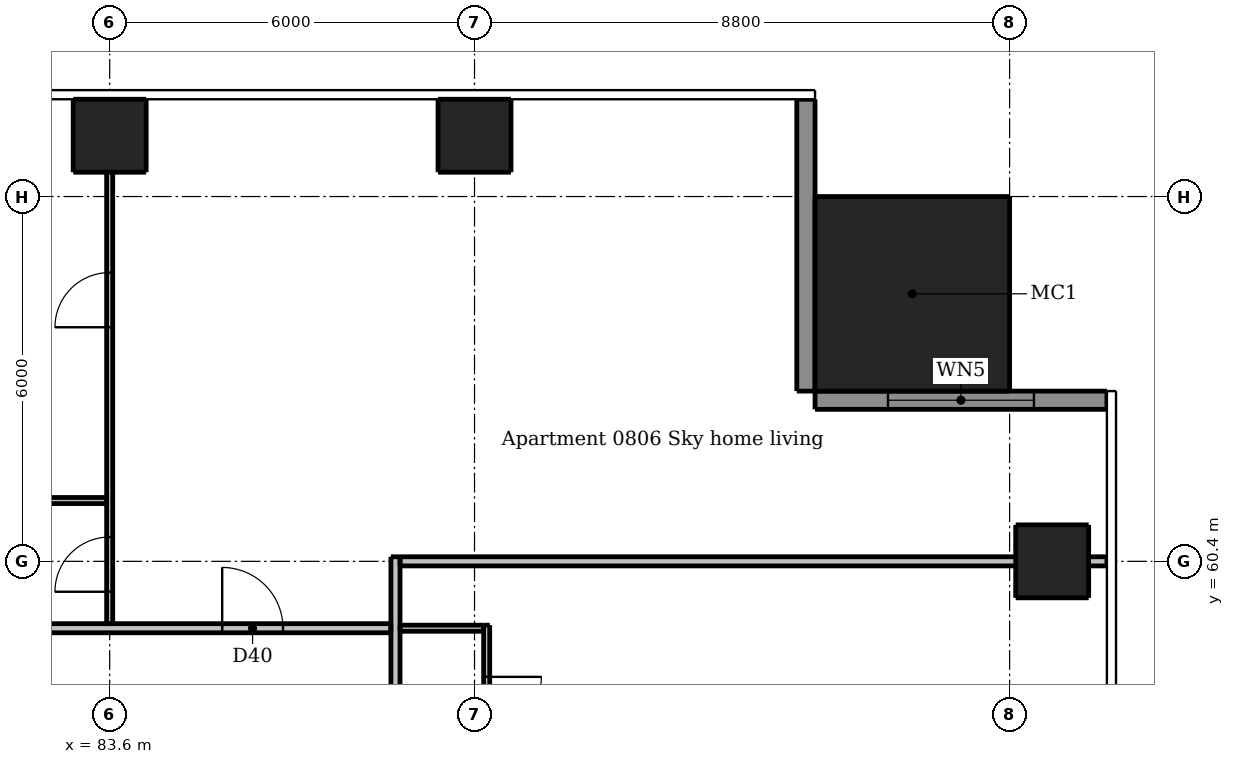
"""IFC4 building model, lengths in metres.
Left out: names, types, materials, properties, quantities, classifications, styles, units other than length and angle.
Written with IfcOpenShell. Run it as: python <this file> out.ifc"""

import sys

from ifc_helpers import new_model, si_unit, direction, frame, frame_2d, origin, origin_2d, place, context, subcontext, project, spatial, rectangle, extrude, element, fill, save


model = new_model("IFC4")
c1 = context("Model", 3, precision=1e-05, world=origin(), true_north=direction((0.0, 1.0)))
c2 = subcontext(c1, "Body", "Model", "MODEL_VIEW")
j1 = project(units=[si_unit("LENGTHUNIT", "METRE"), si_unit("PLANEANGLEUNIT", "RADIAN")], contexts=[c1])
p1 = place(None, origin())
s1 = spatial("IfcSite", under=j1, at=p1, CompositionType="ELEMENT")
p2 = place(p1, origin())
s2 = spatial("IfcBuilding", under=s1, at=p2, CompositionType="ELEMENT")
p3 = place(p2, frame((0.0, 0.0, 33.4)))
s3 = spatial("IfcBuildingStorey", under=s2, at=p3, CompositionType="ELEMENT", Elevation=33.4)
for number, where, z_axis, x_axis in (
    (1, (99.1, 60.4, 0.0), (0.0, 0.0, 1.0), (1.0, 0.0, 0.0)),
    (2, (83.6, 67.4, 0.0), (0.0, 0.0, 1.0), (1.0, 0.0, 0.0)),
    (3, (89.6, 67.4, 0.0), (0.0, 0.0, 1.0), (1.0, 0.0, 0.0)),
):
    element("IfcColumn", number, at=place(p3, frame(where, z_axis=z_axis, x_axis=x_axis)), inside=s3, PredefinedType="COLUMN", context=c2, shape_type="SweptSolid", body=[
        extrude(rectangle(XDim=1.2, YDim=1.2, at=origin_2d()), origin(), (0.0, 0.0, 1.0), 3.05),
    ])
p4 = place(p3, frame((96.8, 64.8, 0.0), z_axis=(0.0, 0.0, 1.0), x_axis=(1.0, 0.0, 0.0)))
e4 = element("IfcColumn", 4, at=p4, inside=s3, PredefinedType="COLUMN", context=c2, shape_type="SweptSolid", body=[
    extrude(rectangle(XDim=3.2, YDim=3.2, at=origin_2d()), origin(), (0.0, 0.0, 1.0), 3.3),
])
p5 = place(p3, frame((100.0, 63.05, 0.0), z_axis=(0.0, 0.0, 1.0), x_axis=(-1.0, 0.0, 0.0)))
e5 = element("IfcWall", 5, at=p5, inside=s3, PredefinedType="SOLIDWALL", context=c2, shape_type="SweptSolid", body=[
    extrude(rectangle(XDim=4.8, YDim=0.3, at=frame_2d((2.4, 0.0))), origin(), (0.0, 0.0, 1.0), 3.05),
])
p6 = place(p5, frame((1.2, 0.0, 0.15)))
e6 = element("IfcOpeningElement", 6, at=p6, cuts=e5, PredefinedType="OPENING", context=c2, shape_type="SweptSolid", body=[
    extrude(rectangle(XDim=2.4, YDim=2.1, at=frame_2d((1.2, 1.05))), frame((0.0, 0.16, 0.0), z_axis=(0.0, -1.0, 0.0), x_axis=(1.0, 0.0, 0.0)), (0.0, 0.0, 1.0), 0.32),
])
p7 = place(p3, frame((95.05, 63.2, 0.0), z_axis=(0.0, 0.0, 1.0), x_axis=(0.0, 1.0, 0.0)))
e7 = element("IfcWall", 7, at=p7, inside=s3, PredefinedType="SOLIDWALL", context=c2, shape_type="SweptSolid", body=[
    extrude(rectangle(XDim=4.8, YDim=0.3, at=frame_2d((2.4, 0.0))), origin(), (0.0, 0.0, 1.0), 3.05),
])
p8 = place(p3, frame((83.6, 59.375, 0.0), z_axis=(0.0, 0.0, 1.0), x_axis=(0.0, 1.0, 0.0)))
e8 = element("IfcWall", 8, at=p8, inside=s3, PredefinedType="PARTITIONING", context=c2, shape_type="SweptSolid", body=[
    extrude(rectangle(XDim=8.625, YDim=0.1, at=frame_2d((4.312, 0.0))), origin(), (0.0, 0.0, 1.0), 2.516),
])
p9 = place(p8, frame((0.525, 0.0, 0.0)))
e9 = element("IfcOpeningElement", 9, at=p9, cuts=e8, PredefinedType="OPENING", context=c2, shape_type="SweptSolid", body=[
    extrude(rectangle(XDim=0.9, YDim=2.1, at=frame_2d((0.45, 1.05))), frame((0.0, 0.06, 0.0), z_axis=(0.0, -1.0, 0.0), x_axis=(1.0, 0.0, 0.0)), (0.0, 0.0, 1.0), 0.12),
])
p10 = place(p8, frame((4.875, 0.0, 0.0)))
e10 = element("IfcOpeningElement", 10, at=p10, cuts=e8, PredefinedType="OPENING", context=c2, shape_type="SweptSolid", body=[
    extrude(rectangle(XDim=0.9, YDim=2.1, at=frame_2d((0.45, 1.05))), frame((0.0, 0.06, 0.0), z_axis=(0.0, -1.0, 0.0), x_axis=(1.0, 0.0, 0.0)), (0.0, 0.0, 1.0), 0.12),
])
p11 = place(p3, frame((89.8, 59.35, 0.0), z_axis=(0.0, 0.0, 1.0), x_axis=(0.0, -1.0, 0.0)))
e11 = element("IfcWall", 11, at=p11, inside=s3, PredefinedType="PARTITIONING", context=c2, shape_type="SweptSolid", body=[
    extrude(rectangle(XDim=19.875, YDim=0.1, at=frame_2d((9.938, 0.0))), origin(), (0.0, 0.0, 1.0), 3.05),
])
p12 = place(p11, frame((15.0, 0.0, 0.0)))
e12 = element("IfcOpeningElement", 12, at=p12, cuts=e11, PredefinedType="OPENING", context=c2, shape_type="SweptSolid", body=[
    extrude(rectangle(XDim=0.9, YDim=2.1, at=frame_2d((0.45, 1.05))), frame((0.0, 0.06, 0.0), z_axis=(0.0, -1.0, 0.0), x_axis=(1.0, 0.0, 0.0)), (0.0, 0.0, 1.0), 0.12),
])
p13 = place(p11, frame((9.0, 0.0, 0.0)))
e13 = element("IfcOpeningElement", 13, at=p13, cuts=e11, PredefinedType="OPENING", context=c2, shape_type="SweptSolid", body=[
    extrude(rectangle(XDim=0.9, YDim=2.1, at=frame_2d((0.45, 1.05))), frame((0.0, 0.06, 0.0), z_axis=(0.0, -1.0, 0.0), x_axis=(1.0, 0.0, 0.0)), (0.0, 0.0, 1.0), 0.12),
])
p14 = place(p11, frame((6.0, 0.0, 0.0)))
e14 = element("IfcOpeningElement", 14, at=p14, cuts=e11, PredefinedType="OPENING", context=c2, shape_type="SweptSolid", body=[
    extrude(rectangle(XDim=0.9, YDim=2.1, at=frame_2d((0.45, 1.05))), frame((0.0, 0.06, 0.0), z_axis=(0.0, -1.0, 0.0), x_axis=(1.0, 0.0, 0.0)), (0.0, 0.0, 1.0), 0.12),
])
p15 = place(p11, frame((0.85, 0.0, 0.0)))
e15 = element("IfcOpeningElement", 15, at=p15, cuts=e11, PredefinedType="OPENING", context=c2, shape_type="SweptSolid", body=[
    extrude(rectangle(XDim=0.9, YDim=2.1, at=frame_2d((0.45, 1.05))), frame((0.0, 0.06, 0.0), z_axis=(0.0, -1.0, 0.0), x_axis=(1.0, 0.0, 0.0)), (0.0, 0.0, 1.0), 0.12),
])
p16 = place(p11, frame((3.35, 0.0, 0.0)))
e16 = element("IfcOpeningElement", 16, at=p16, cuts=e11, PredefinedType="OPENING", context=c2, shape_type="SweptSolid", body=[
    extrude(rectangle(XDim=0.8, YDim=2.1, at=frame_2d((0.4, 1.05))), frame((0.0, 0.06, 0.0), z_axis=(0.0, -1.0, 0.0), x_axis=(1.0, 0.0, 0.0)), (0.0, 0.0, 1.0), 0.12),
])
p17 = place(p3, frame((83.55, 61.4, 0.0), z_axis=(0.0, 0.0, 1.0), x_axis=(-1.0, 0.0, 0.0)))
e17 = element("IfcWall", 17, at=p17, inside=s3, PredefinedType="PARTITIONING", context=c2, shape_type="SweptSolid", body=[
    extrude(rectangle(XDim=5.875, YDim=0.1, at=frame_2d((2.938, 0.0))), origin(), (0.0, 0.0, 1.0), 3.05),
])
p18 = place(p17, frame((3.75, 0.0, 0.0)))
e18 = element("IfcOpeningElement", 18, at=p18, cuts=e17, PredefinedType="OPENING", context=c2, shape_type="SweptSolid", body=[
    extrude(rectangle(XDim=0.8, YDim=2.1, at=frame_2d((0.4, 1.05))), frame((0.0, 0.06, 0.0), z_axis=(0.0, -1.0, 0.0), x_axis=(1.0, 0.0, 0.0)), (0.0, 0.0, 1.0), 0.12),
])
p19 = place(p3, frame((88.375, 59.3, 0.0), z_axis=(0.0, 0.0, 1.0), x_axis=(1.0, 0.0, 0.0)))
e19 = element("IfcWall", 19, at=p19, inside=s3, PredefinedType="PARTITIONING", context=c2, shape_type="SweptSolid", body=[
    extrude(rectangle(XDim=1.375, YDim=0.1, at=frame_2d((0.688, 0.0))), origin(), (0.0, 0.0, 1.0), 3.05),
])
p20 = place(p3, frame((88.3, 60.475, 0.0), z_axis=(0.0, 0.0, 1.0), x_axis=(0.0, -1.0, 0.0)))
e20 = element("IfcWall", 20, at=p20, inside=s3, PredefinedType="PARTITIONING", context=c2, shape_type="SweptSolid", body=[
    extrude(rectangle(XDim=28.7, YDim=0.15, at=frame_2d((14.35, 0.0))), origin(), (0.0, 0.0, 1.0), 3.05),
])
p21 = place(p20, frame((27.425, 0.0, 0.0)))
e21 = element("IfcOpeningElement", 21, at=p21, cuts=e20, PredefinedType="OPENING", context=c2, shape_type="SweptSolid", body=[
    extrude(rectangle(XDim=1.0, YDim=2.1, at=frame_2d((0.5, 1.05))), frame((0.0, 0.085, 0.0), z_axis=(0.0, -1.0, 0.0), x_axis=(1.0, 0.0, 0.0)), (0.0, 0.0, 1.0), 0.17),
])
p22 = place(p20, frame((10.625, 0.0, 0.0)))
e22 = element("IfcOpeningElement", 22, at=p22, cuts=e20, PredefinedType="OPENING", context=c2, shape_type="SweptSolid", body=[
    extrude(rectangle(XDim=1.0, YDim=2.1, at=frame_2d((0.5, 1.05))), frame((0.0, 0.085, 0.0), z_axis=(0.0, -1.0, 0.0), x_axis=(1.0, 0.0, 0.0)), (0.0, 0.0, 1.0), 0.17),
])
p23 = place(p3, frame((88.375, 60.4, 0.0), z_axis=(0.0, 0.0, 1.0), x_axis=(1.0, 0.0, 0.0)))
e23 = element("IfcWall", 23, at=p23, inside=s3, PredefinedType="PARTITIONING", context=c2, shape_type="SweptSolid", body=[
    extrude(rectangle(XDim=11.625, YDim=0.15, at=frame_2d((5.812, 0.0))), origin(), (0.0, 0.0, 1.0), 2.516),
])
p24 = place(p3, frame((59.675, 59.3, 0.0), z_axis=(0.0, 0.0, 1.0), x_axis=(1.0, 0.0, 0.0)))
e24 = element("IfcWall", 24, at=p24, inside=s3, PredefinedType="PARTITIONING", context=c2, shape_type="SweptSolid", body=[
    extrude(rectangle(XDim=28.55, YDim=0.15, at=frame_2d((14.275, 0.0))), origin(), (0.0, 0.0, 1.0), 3.05),
])
p25 = place(p24, frame((8.975, 0.0, 0.0)))
e25 = element("IfcOpeningElement", 25, at=p25, cuts=e24, PredefinedType="OPENING", context=c2, shape_type="SweptSolid", body=[
    extrude(rectangle(XDim=1.0, YDim=2.1, at=frame_2d((0.5, 1.05))), frame((0.0, 0.085, 0.0), z_axis=(0.0, -1.0, 0.0), x_axis=(1.0, 0.0, 0.0)), (0.0, 0.0, 1.0), 0.17),
])
p26 = place(p24, frame((25.775, 0.0, 0.0)))
e26 = element("IfcOpeningElement", 26, at=p26, cuts=e24, PredefinedType="OPENING", context=c2, shape_type="SweptSolid", body=[
    extrude(rectangle(XDim=1.0, YDim=2.1, at=frame_2d((0.5, 1.05))), frame((0.0, 0.085, 0.0), z_axis=(0.0, -1.0, 0.0), x_axis=(1.0, 0.0, 0.0)), (0.0, 0.0, 1.0), 0.17),
])
p27 = place(p6, origin())
e27 = element("IfcWindow", 27, at=p27, inside=s3, PartitioningType="DOUBLE_PANEL_VERTICAL", PredefinedType="WINDOW", context=c2, shape_type="SweptSolid", body=[
    extrude(rectangle(XDim=2.4, YDim=2.1, at=frame_2d((1.2, 1.05))), frame((0.0, 0.03, 0.0), z_axis=(0.0, -1.0, 0.0), x_axis=(1.0, 0.0, 0.0)), (0.0, 0.0, 1.0), 0.06),
])
fill(e6, e27)
p28 = place(p15, origin())
e28 = element("IfcDoor", 28, at=p28, inside=s3, OperationType="SINGLE_SWING_LEFT", PredefinedType="DOOR", context=c2, shape_type="SweptSolid", body=[
    extrude(rectangle(XDim=0.9, YDim=2.1, at=frame_2d((0.45, 1.05))), frame((0.0, 0.025, 0.0), z_axis=(0.0, -1.0, 0.0), x_axis=(1.0, 0.0, 0.0)), (0.0, 0.0, 1.0), 0.05),
])
fill(e15, e28)
p29 = place(p26, origin())
e29 = element("IfcDoor", 29, at=p29, inside=s3, OperationType="SINGLE_SWING_LEFT", PredefinedType="DOOR", context=c2, shape_type="SweptSolid", body=[
    extrude(rectangle(XDim=1.0, YDim=2.1, at=frame_2d((0.5, 1.05))), frame((0.0, 0.025, 0.0), z_axis=(0.0, -1.0, 0.0), x_axis=(1.0, 0.0, 0.0)), (0.0, 0.0, 1.0), 0.05),
])
fill(e26, e29)
p30 = place(p9, origin())
e30 = element("IfcDoor", 30, at=p30, inside=s3, OperationType="SINGLE_SWING_LEFT", PredefinedType="DOOR", context=c2, shape_type="SweptSolid", body=[
    extrude(rectangle(XDim=0.9, YDim=2.1, at=frame_2d((0.45, 1.05))), frame((0.0, 0.025, 0.0), z_axis=(0.0, -1.0, 0.0), x_axis=(1.0, 0.0, 0.0)), (0.0, 0.0, 1.0), 0.05),
])
fill(e9, e30)
p31 = place(p10, origin())
e31 = element("IfcDoor", 31, at=p31, inside=s3, OperationType="SINGLE_SWING_LEFT", PredefinedType="DOOR", context=c2, shape_type="SweptSolid", body=[
    extrude(rectangle(XDim=0.9, YDim=2.1, at=frame_2d((0.45, 1.05))), frame((0.0, 0.025, 0.0), z_axis=(0.0, -1.0, 0.0), x_axis=(1.0, 0.0, 0.0)), (0.0, 0.0, 1.0), 0.05),
])
fill(e10, e31)
save(model, sys.argv[1])
